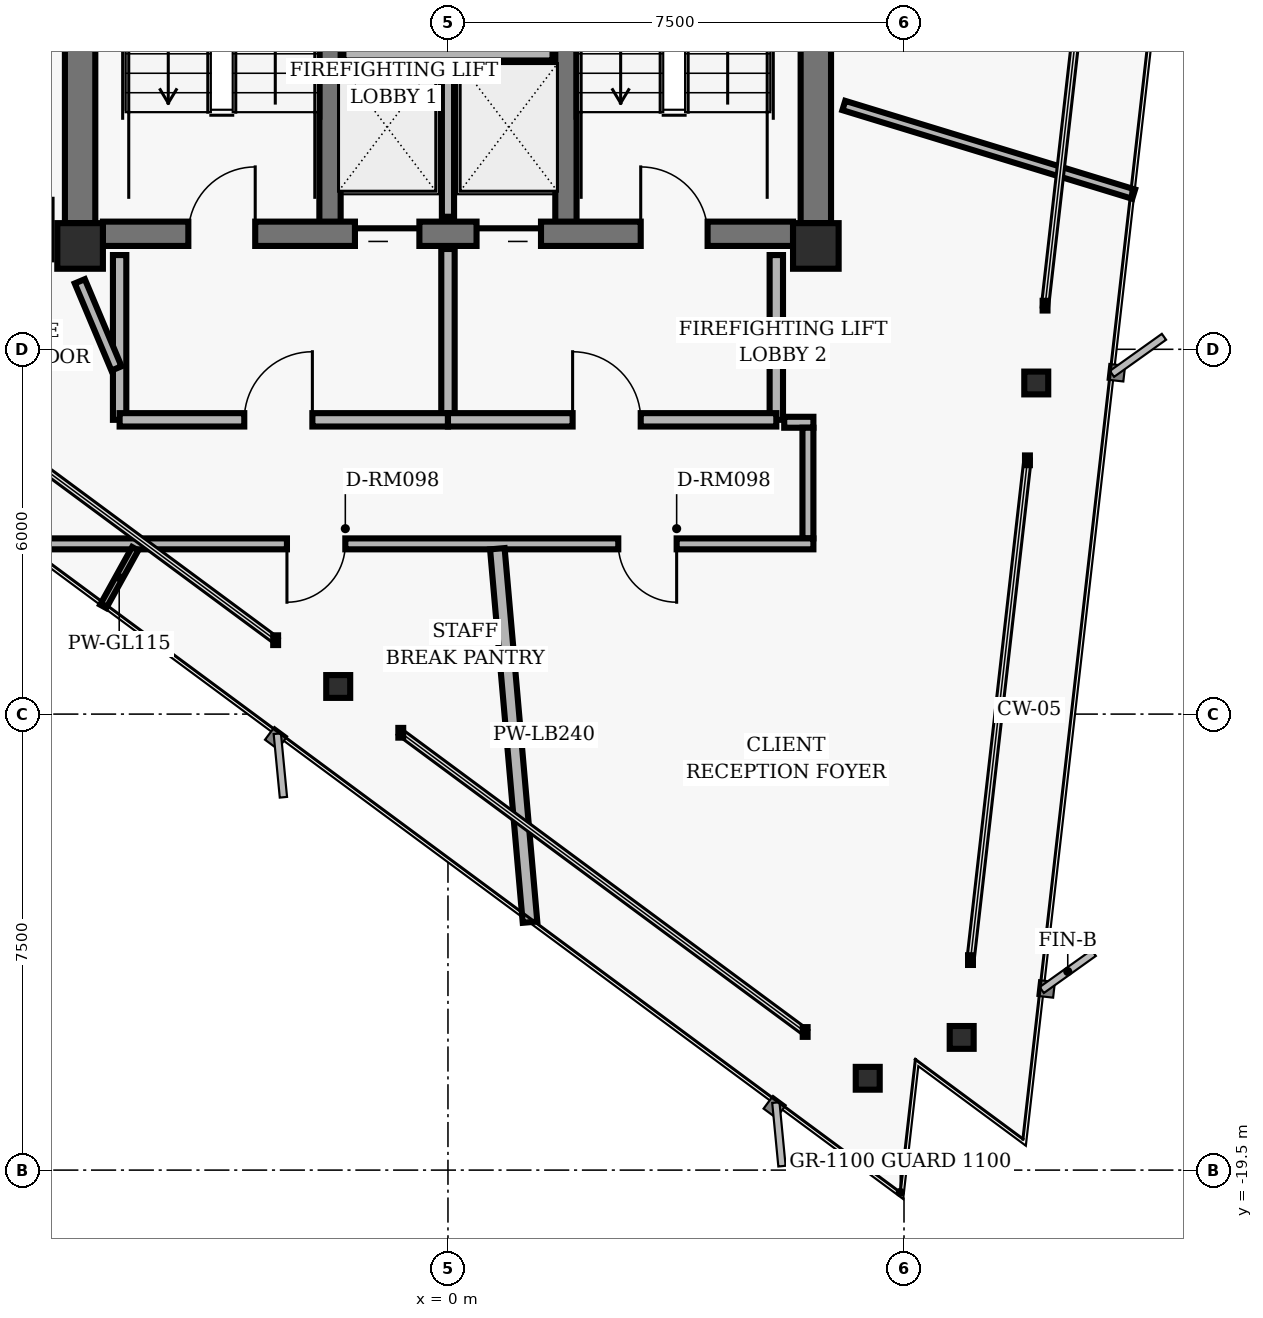
"""IFC4 building model, lengths in metres.
Left out: names, types, materials, properties, quantities, classifications, styles, units other than length and angle.
Written with IfcOpenShell. Run it as: python <this file> out.ifc"""

import sys

from ifc_helpers import new_model, si_unit, direction, frame, frame_2d, origin, origin_2d, place, context, subcontext, project, spatial, rectangle, hollow_rectangle, i_section, extrude, element, fill, save


model = new_model("IFC4")
c1 = context("Model", 3, precision=1e-05, world=origin(), true_north=direction((0.0, 1.0)))
c2 = subcontext(c1, "Body", "Model", "MODEL_VIEW")
j1 = project(units=[si_unit("LENGTHUNIT", "METRE"), si_unit("PLANEANGLEUNIT", "RADIAN")], contexts=[c1])
p1 = place(None, origin())
s1 = spatial("IfcSite", under=j1, at=p1, CompositionType="ELEMENT")
p2 = place(p1, origin())
s2 = spatial("IfcBuilding", under=s1, at=p2, CompositionType="ELEMENT")
p3 = place(p2, frame((0.0, 0.0, 224.0)))
s3 = spatial("IfcBuildingStorey", under=s2, at=p3, CompositionType="ELEMENT", Elevation=224.0)
for number, where, z_axis, x_axis in (
    (1, (-6.05, -4.3, 0.0), (0.0, 0.0, 1.0), (1.0, 0.0, 0.0)),
    (2, (6.05, -4.3, 0.0), (0.0, 0.0, 1.0), (1.0, 0.0, 0.0)),
):
    element("IfcColumn", number, at=place(p3, frame(where, z_axis=z_axis, x_axis=x_axis)), inside=s3, PredefinedType="COLUMN", context=c2, shape_type="SweptSolid", body=[
        extrude(hollow_rectangle(XDim=0.75, YDim=0.75, WallThickness=0.05, InnerFilletRadius=0.02, OuterFilletRadius=0.04, at=origin_2d()), origin(), (0.0, 0.0, 1.0), 3.04),
    ])
for number, where, z_axis, x_axis in (
    (3, (-6.05, -3.925, 0.0), (0.0, 0.0, 1.0), (0.0, 1.0, 0.0)),
    (4, (6.05, -3.925, 0.0), (0.0, 0.0, 1.0), (0.0, 1.0, 0.0)),
):
    element("IfcWall", number, at=place(p3, frame(where, z_axis=z_axis, x_axis=x_axis)), inside=s3, PredefinedType="SHEAR", context=c2, shape_type="SweptSolid", body=[
        extrude(rectangle(XDim=3.55, YDim=0.5, at=frame_2d((1.775, 0.0))), origin(), (0.0, 0.0, 1.0), 2.798),
    ])
for number, where, z_axis, x_axis in (
    (5, (-1.94, -4.1, 0.0), (0.0, 0.0, 1.0), (0.0, 1.0, 0.0)),
    (6, (1.94, -4.1, 0.0), (0.0, 0.0, 1.0), (0.0, 1.0, 0.0)),
):
    element("IfcWall", number, at=place(p3, frame(where, z_axis=z_axis, x_axis=x_axis)), inside=s3, PredefinedType="SHEAR", context=c2, shape_type="SweptSolid", body=[
        extrude(rectangle(XDim=8.2, YDim=0.35, at=frame_2d((4.1, 0.0))), origin(), (0.0, 0.0, 1.0), 2.798),
    ])
p4 = place(p3, frame((-5.675, -4.1, 0.0), z_axis=(0.0, 0.0, 1.0), x_axis=(1.0, 0.0, 0.0)))
e7 = element("IfcWall", 7, at=p4, inside=s3, PredefinedType="SHEAR", context=c2, shape_type="SweptSolid", body=[
    extrude(rectangle(XDim=11.35, YDim=0.4, at=frame_2d((5.675, 0.0))), origin(), (0.0, 0.0, 1.0), 2.798),
])
p5 = place(p4, frame((1.405, 0.0, 0.0)))
e8 = element("IfcOpeningElement", 8, at=p5, cuts=e7, PredefinedType="OPENING", context=c2, shape_type="SweptSolid", body=[
    extrude(rectangle(XDim=1.1, YDim=2.04, at=frame_2d((0.55, 1.02))), frame((0.0, 0.21, 0.0), z_axis=(0.0, -1.0, 0.0), x_axis=(1.0, 0.0, 0.0)), (0.0, 0.0, 1.0), 0.42),
])
p6 = place(p4, frame((8.845, 0.0, 0.0)))
e9 = element("IfcOpeningElement", 9, at=p6, cuts=e7, PredefinedType="OPENING", context=c2, shape_type="SweptSolid", body=[
    extrude(rectangle(XDim=1.1, YDim=2.04, at=frame_2d((0.55, 1.02))), frame((0.0, 0.21, 0.0), z_axis=(0.0, -1.0, 0.0), x_axis=(1.0, 0.0, 0.0)), (0.0, 0.0, 1.0), 0.42),
])
p7 = place(p4, frame((4.145, 0.0, 0.0)))
e10 = element("IfcOpeningElement", 10, at=p7, cuts=e7, PredefinedType="OPENING", context=c2, shape_type="SweptSolid", body=[
    extrude(rectangle(XDim=1.06, YDim=2.04, at=frame_2d((0.53, 1.02))), frame((0.0, 0.21, 0.0), z_axis=(0.0, -1.0, 0.0), x_axis=(1.0, 0.0, 0.0)), (0.0, 0.0, 1.0), 0.42),
])
p8 = place(p4, frame((6.145, 0.0, 0.0)))
e11 = element("IfcOpeningElement", 11, at=p8, cuts=e7, PredefinedType="OPENING", context=c2, shape_type="SweptSolid", body=[
    extrude(rectangle(XDim=1.06, YDim=2.04, at=frame_2d((0.53, 1.02))), frame((0.0, 0.21, 0.0), z_axis=(0.0, -1.0, 0.0), x_axis=(1.0, 0.0, 0.0)), (0.0, 0.0, 1.0), 0.42),
])
for number, where, z_axis, x_axis in (
    (12, (8.448, -17.318, 0.0), (0.0, 0.0, 1.0), (1.0, 0.0, 0.0)),
    (13, (9.675, -6.554, 0.0), (0.0, 0.0, 1.0), (1.0, 0.0, 0.0)),
    (14, (-1.805, -11.546, 0.0), (0.0, 0.0, 1.0), (1.0, 0.0, 0.0)),
    (15, (6.903, -17.99, 0.0), (0.0, 0.0, 1.0), (1.0, 0.0, 0.0)),
):
    element("IfcColumn", number, at=place(p3, frame(where, z_axis=z_axis, x_axis=x_axis)), inside=s3, PredefinedType="COLUMN", context=c2, shape_type="SweptSolid", body=[
        extrude(i_section(OverallWidth=0.394, OverallDepth=0.375, WebThickness=0.017, FlangeThickness=0.028, FilletRadius=0.016, at=origin_2d()), origin(), (0.0, 0.0, 1.0), 3.04),
    ])
p9 = place(p3, frame((0.0, -3.82, 0.0), z_axis=(0.0, 0.0, 1.0), x_axis=(0.0, 1.0, 0.0)))
e16 = element("IfcWall", 16, at=p9, inside=s3, PredefinedType="PARTITIONING", context=c2, shape_type="SweptSolid", body=[
    extrude(rectangle(XDim=2.67, YDim=0.2, at=frame_2d((1.335, 0.0))), origin(), (0.0, 0.0, 1.0), 2.773),
])
p10 = place(p3, frame((-1.72, -1.15, 0.0), z_axis=(0.0, 0.0, 1.0), x_axis=(1.0, 0.0, 0.0)))
e17 = element("IfcWall", 17, at=p10, inside=s3, PredefinedType="PARTITIONING", context=c2, shape_type="SweptSolid", body=[
    extrude(rectangle(XDim=3.44, YDim=0.2, at=frame_2d((1.72, 0.0))), origin(), (0.0, 0.0, 1.0), 2.773),
])
for number, where, z_axis, x_axis in (
    (18, (-5.4, -7.16, 0.0), (0.0, 0.0, 1.0), (0.0, 1.0, 0.0)),
    (19, (5.4, -7.16, 0.0), (0.0, 0.0, 1.0), (0.0, 1.0, 0.0)),
):
    element("IfcWall", number, at=place(p3, frame(where, z_axis=z_axis, x_axis=x_axis)), inside=s3, PredefinedType="PARTITIONING", context=c2, shape_type="SweptSolid", body=[
        extrude(rectangle(XDim=2.71, YDim=0.22, at=frame_2d((1.355, 0.0))), origin(), (0.0, 0.0, 1.0), 2.773),
    ])
p11 = place(p3, frame((0.0, -7.16, 0.0), z_axis=(0.0, 0.0, 1.0), x_axis=(0.0, 1.0, 0.0)))
e20 = element("IfcWall", 20, at=p11, inside=s3, PredefinedType="PARTITIONING", context=c2, shape_type="SweptSolid", body=[
    extrude(rectangle(XDim=2.81, YDim=0.22, at=frame_2d((1.405, 0.0))), origin(), (0.0, 0.0, 1.0), 2.773),
])
p12 = place(p3, frame((-5.4, -7.16, 0.0), z_axis=(0.0, 0.0, 1.0), x_axis=(1.0, 0.0, 0.0)))
e21 = element("IfcWall", 21, at=p12, inside=s3, PredefinedType="PARTITIONING", context=c2, shape_type="SweptSolid", body=[
    extrude(rectangle(XDim=5.4, YDim=0.22, at=frame_2d((2.7, 0.0))), origin(), (0.0, 0.0, 1.0), 2.395),
])
p13 = place(p12, frame((2.05, 0.0, 0.0)))
e22 = element("IfcOpeningElement", 22, at=p13, cuts=e21, PredefinedType="OPENING", context=c2, shape_type="SweptSolid", body=[
    extrude(rectangle(XDim=1.12, YDim=2.02, at=frame_2d((0.56, 1.01))), frame((0.0, 0.12, 0.0), z_axis=(0.0, -1.0, 0.0), x_axis=(1.0, 0.0, 0.0)), (0.0, 0.0, 1.0), 0.24),
])
p14 = place(p3, frame((0.0, -7.16, 0.0), z_axis=(0.0, 0.0, 1.0), x_axis=(1.0, 0.0, 0.0)))
e23 = element("IfcWall", 23, at=p14, inside=s3, PredefinedType="PARTITIONING", context=c2, shape_type="SweptSolid", body=[
    extrude(rectangle(XDim=5.4, YDim=0.22, at=frame_2d((2.7, 0.0))), origin(), (0.0, 0.0, 1.0), 2.773),
])
p15 = place(p14, frame((2.05, 0.0, 0.0)))
e24 = element("IfcOpeningElement", 24, at=p15, cuts=e23, PredefinedType="OPENING", context=c2, shape_type="SweptSolid", body=[
    extrude(rectangle(XDim=1.12, YDim=2.02, at=frame_2d((0.56, 1.01))), frame((0.0, 0.12, 0.0), z_axis=(0.0, -1.0, 0.0), x_axis=(1.0, 0.0, 0.0)), (0.0, 0.0, 1.0), 0.24),
])
p16 = place(p3, frame((-6.055, -4.882, 0.0), z_axis=(0.0, 0.0, 1.0), x_axis=(0.387579540458, -0.921836265189, 0.0)))
e25 = element("IfcWall", 25, at=p16, inside=s3, PredefinedType="PARTITIONING", context=c2, shape_type="SweptSolid", body=[
    extrude(rectangle(XDim=1.555, YDim=0.18, at=frame_2d((0.777, 0.0))), origin(), (0.0, 0.0, 1.0), 2.253),
])
p17 = place(p3, frame((5.53, -7.2, 0.0), z_axis=(0.0, 0.0, 1.0), x_axis=(1.0, 0.0, 0.0)))
e26 = element("IfcWall", 26, at=p17, inside=s3, PredefinedType="PARTITIONING", context=c2, shape_type="SweptSolid", body=[
    extrude(rectangle(XDim=0.48, YDim=0.18, at=frame_2d((0.24, 0.0))), origin(), (0.0, 0.0, 1.0), 2.773),
])
p18 = place(p3, frame((5.92, -7.29, 0.0), z_axis=(0.0, 0.0, 1.0), x_axis=(0.0, -1.0, 0.0)))
e27 = element("IfcWall", 27, at=p18, inside=s3, PredefinedType="PARTITIONING", context=c2, shape_type="SweptSolid", body=[
    extrude(rectangle(XDim=1.82, YDim=0.18, at=frame_2d((0.91, 0.0))), origin(), (0.0, 0.0, 1.0), 2.253),
])
p19 = place(p3, frame((6.01, -9.2, 0.0), z_axis=(0.0, 0.0, 1.0), x_axis=(-1.0, 0.0, 0.0)))
e28 = element("IfcWall", 28, at=p19, inside=s3, PredefinedType="PARTITIONING", context=c2, shape_type="SweptSolid", body=[
    extrude(rectangle(XDim=12.84, YDim=0.18, at=frame_2d((6.42, 0.0))), origin(), (0.0, 0.0, 1.0), 2.773),
])
p20 = place(p19, frame((7.698, 0.0, 0.0)))
e29 = element("IfcOpeningElement", 29, at=p20, cuts=e28, PredefinedType="OPENING", context=c2, shape_type="SweptSolid", body=[
    extrude(rectangle(XDim=0.96, YDim=2.02, at=frame_2d((0.48, 1.01))), frame((0.0, 0.1, 0.0), z_axis=(0.0, -1.0, 0.0), x_axis=(1.0, 0.0, 0.0)), (0.0, 0.0, 1.0), 0.2),
])
p21 = place(p19, frame((2.249, 0.0, 0.0)))
e30 = element("IfcOpeningElement", 30, at=p21, cuts=e28, PredefinedType="OPENING", context=c2, shape_type="SweptSolid", body=[
    extrude(rectangle(XDim=0.96, YDim=2.02, at=frame_2d((0.48, 1.01))), frame((0.0, 0.1, 0.0), z_axis=(0.0, -1.0, 0.0), x_axis=(1.0, 0.0, 0.0)), (0.0, 0.0, 1.0), 0.2),
])
p22 = place(p3, frame((-5.144, -9.28, 0.0), z_axis=(0.0, 0.0, 1.0), x_axis=(-0.484725114425, -0.874666544144, 0.0)))
e31 = element("IfcWall", 31, at=p22, inside=s3, PredefinedType="MOVABLE", context=c2, shape_type="SweptSolid", body=[
    extrude(rectangle(XDim=1.084, YDim=0.115, at=frame_2d((0.542, 0.0))), origin(), (0.0, 0.0, 1.0), 2.773),
])
p23 = place(p3, frame((0.812, -9.28, 0.0), z_axis=(0.0, 0.0, 1.0), x_axis=(0.087150741032, -0.996195135673, 0.0)))
e32 = element("IfcWall", 32, at=p23, inside=s3, PredefinedType="PARTITIONING", context=c2, shape_type="SweptSolid", body=[
    extrude(rectangle(XDim=6.166, YDim=0.24, at=frame_2d((3.083, 0.0))), origin(), (0.0, 0.0, 1.0), 2.773),
])
p24 = place(p3, frame((6.51, -1.99, 0.0), z_axis=(0.0, 0.0, 1.0), x_axis=(0.956296423481, -0.292398957653, 0.0)))
e33 = element("IfcWall", 33, at=p24, inside=s3, PredefinedType="PARTITIONING", context=c2, shape_type="SweptSolid", body=[
    extrude(rectangle(XDim=4.985, YDim=0.16, at=frame_2d((2.492, 0.0))), origin(), (0.0, 0.0, 1.0), 2.773),
])
p25 = place(p5, origin())
e34 = element("IfcDoor", 34, at=p25, inside=s3, OperationType="SINGLE_SWING_RIGHT", PredefinedType="DOOR", context=c2, shape_type="SweptSolid", body=[
    extrude(rectangle(XDim=1.1, YDim=2.04, at=frame_2d((0.55, 1.02))), frame((0.0, 0.025, 0.0), z_axis=(0.0, -1.0, 0.0), x_axis=(1.0, 0.0, 0.0)), (0.0, 0.0, 1.0), 0.05),
])
fill(e8, e34)
p26 = place(p6, origin())
e35 = element("IfcDoor", 35, at=p26, inside=s3, OperationType="SINGLE_SWING_LEFT", PredefinedType="DOOR", context=c2, shape_type="SweptSolid", body=[
    extrude(rectangle(XDim=1.1, YDim=2.04, at=frame_2d((0.55, 1.02))), frame((0.0, 0.025, 0.0), z_axis=(0.0, -1.0, 0.0), x_axis=(1.0, 0.0, 0.0)), (0.0, 0.0, 1.0), 0.05),
])
fill(e9, e35)
p27 = place(p7, origin())
e36 = element("IfcDoor", 36, at=p27, inside=s3, OperationType="SLIDING_TO_LEFT", PredefinedType="DOOR", context=c2, shape_type="SweptSolid", body=[
    extrude(rectangle(XDim=1.06, YDim=2.04, at=frame_2d((0.53, 1.02))), frame((0.0, 0.025, 0.0), z_axis=(0.0, -1.0, 0.0), x_axis=(1.0, 0.0, 0.0)), (0.0, 0.0, 1.0), 0.05),
])
fill(e10, e36)
p28 = place(p8, origin())
e37 = element("IfcDoor", 37, at=p28, inside=s3, OperationType="SLIDING_TO_RIGHT", PredefinedType="DOOR", context=c2, shape_type="SweptSolid", body=[
    extrude(rectangle(XDim=1.06, YDim=2.04, at=frame_2d((0.53, 1.02))), frame((0.0, 0.025, 0.0), z_axis=(0.0, -1.0, 0.0), x_axis=(1.0, 0.0, 0.0)), (0.0, 0.0, 1.0), 0.05),
])
fill(e11, e37)
p29 = place(p13, origin())
e38 = element("IfcDoor", 38, at=p29, inside=s3, OperationType="SINGLE_SWING_RIGHT", PredefinedType="DOOR", context=c2, shape_type="SweptSolid", body=[
    extrude(rectangle(XDim=1.12, YDim=2.02, at=frame_2d((0.56, 1.01))), frame((0.0, 0.025, 0.0), z_axis=(0.0, -1.0, 0.0), x_axis=(1.0, 0.0, 0.0)), (0.0, 0.0, 1.0), 0.05),
])
fill(e22, e38)
p30 = place(p15, origin())
e39 = element("IfcDoor", 39, at=p30, inside=s3, OperationType="SINGLE_SWING_LEFT", PredefinedType="DOOR", context=c2, shape_type="SweptSolid", body=[
    extrude(rectangle(XDim=1.12, YDim=2.02, at=frame_2d((0.56, 1.01))), frame((0.0, 0.025, 0.0), z_axis=(0.0, -1.0, 0.0), x_axis=(1.0, 0.0, 0.0)), (0.0, 0.0, 1.0), 0.05),
])
fill(e24, e39)
p31 = place(p20, origin())
e40 = element("IfcDoor", 40, at=p31, inside=s3, OperationType="SINGLE_SWING_RIGHT", PredefinedType="DOOR", context=c2, shape_type="SweptSolid", body=[
    extrude(rectangle(XDim=0.96, YDim=2.02, at=frame_2d((0.48, 1.01))), frame((0.0, 0.025, 0.0), z_axis=(0.0, -1.0, 0.0), x_axis=(1.0, 0.0, 0.0)), (0.0, 0.0, 1.0), 0.05),
])
fill(e29, e40)
p32 = place(p21, origin())
e41 = element("IfcDoor", 41, at=p32, inside=s3, OperationType="SINGLE_SWING_LEFT", PredefinedType="DOOR", context=c2, shape_type="SweptSolid", body=[
    extrude(rectangle(XDim=0.96, YDim=2.02, at=frame_2d((0.48, 1.01))), frame((0.0, 0.025, 0.0), z_axis=(0.0, -1.0, 0.0), x_axis=(1.0, 0.0, 0.0)), (0.0, 0.0, 1.0), 0.05),
])
fill(e30, e41)
save(model, sys.argv[1])
